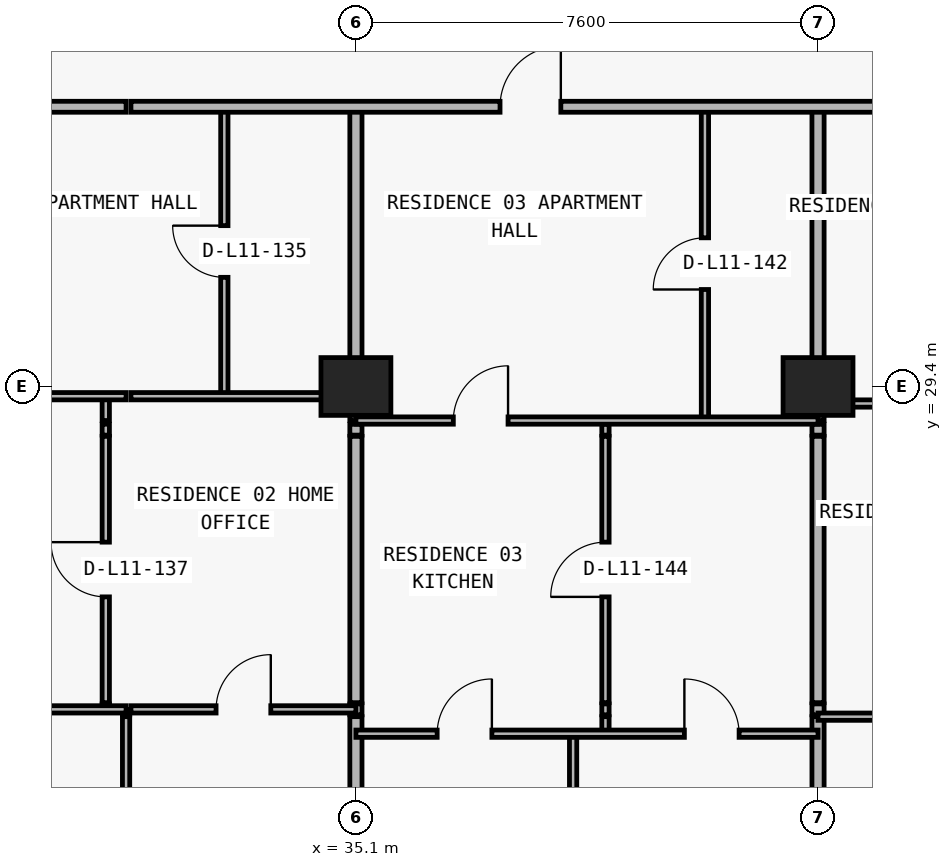
"""IFC4 building model, lengths in metres.
Left out: names, types, materials, properties, quantities, classifications, styles, units other than length and angle.
Written with IfcOpenShell. Run it as: python <this file> out.ifc"""

import sys

from ifc_helpers import new_model, si_unit, direction, frame, frame_2d, origin, origin_2d, place, context, subcontext, project, spatial, rectangle, extrude, element, fill, save


model = new_model("IFC4")
c1 = context("Model", 3, precision=1e-05, world=origin(), true_north=direction((0.0, 1.0)))
c2 = subcontext(c1, "Body", "Model", "MODEL_VIEW")
j1 = project(units=[si_unit("LENGTHUNIT", "METRE"), si_unit("PLANEANGLEUNIT", "RADIAN")], contexts=[c1])
p1 = place(None, origin())
s1 = spatial("IfcSite", under=j1, at=p1, CompositionType="ELEMENT")
p2 = place(p1, origin())
s2 = spatial("IfcBuilding", under=s1, at=p2, CompositionType="ELEMENT")
p3 = place(p2, frame((0.0, 0.0, 46.5)))
s3 = spatial("IfcBuildingStorey", under=s2, at=p3, CompositionType="ELEMENT", Elevation=46.5)
for number, where, z_axis, x_axis in (
    (1, (35.1, 29.4, 0.0), (0.0, 0.0, 1.0), (1.0, 0.0, 0.0)),
    (2, (42.7, 29.4, 0.0), (0.0, 0.0, 1.0), (1.0, 0.0, 0.0)),
):
    element("IfcColumn", number, at=place(p3, frame(where, z_axis=z_axis, x_axis=x_axis)), inside=s3, PredefinedType="COLUMN", context=c2, shape_type="SweptSolid", body=[
        extrude(rectangle(XDim=1.15, YDim=0.95, at=origin_2d()), origin(), (0.0, 0.0, 1.0), 3.05),
    ])
p4 = place(p3, frame((30.986, 24.09, 0.0), z_axis=(0.0, 0.0, 1.0), x_axis=(0.0, 1.0, 0.0)))
e3 = element("IfcWall", 3, at=p4, inside=s3, PredefinedType="PARTITIONING", context=c2, shape_type="SweptSolid", body=[
    extrude(rectangle(XDim=0.09, YDim=0.12, at=frame_2d((0.045, 0.0))), origin(), (0.0, 0.0, 1.0), 3.05),
])
p5 = place(p3, frame((30.986, 24.2, 0.0), z_axis=(0.0, 0.0, 1.0), x_axis=(0.0, 1.0, 0.0)))
e4 = element("IfcWall", 4, at=p5, inside=s3, PredefinedType="PARTITIONING", context=c2, shape_type="SweptSolid", body=[
    extrude(rectangle(XDim=4.38, YDim=0.12, at=frame_2d((2.19, 0.0))), origin(), (0.0, 0.0, 1.0), 3.05),
])
p6 = place(p5, frame((1.74, 0.0, 0.0)))
e5 = element("IfcOpeningElement", 5, at=p6, cuts=e4, PredefinedType="OPENING", context=c2, shape_type="SweptSolid", body=[
    extrude(rectangle(XDim=0.9, YDim=2.15, at=frame_2d((0.45, 1.075))), frame((0.0, 0.07, 0.0), z_axis=(0.0, -1.0, 0.0), x_axis=(1.0, 0.0, 0.0)), (0.0, 0.0, 1.0), 0.14),
])
p7 = place(p3, frame((30.986, 28.6, 0.0), z_axis=(0.0, 0.0, 1.0), x_axis=(0.0, 1.0, 0.0)))
e6 = element("IfcWall", 6, at=p7, inside=s3, PredefinedType="PARTITIONING", context=c2, shape_type="SweptSolid", body=[
    extrude(rectangle(XDim=0.18, YDim=0.12, at=frame_2d((0.09, 0.0))), origin(), (0.0, 0.0, 1.0), 3.05),
])
p8 = place(p3, frame((30.986, 28.84, 0.0), z_axis=(0.0, 0.0, 1.0), x_axis=(0.0, 1.0, 0.0)))
e7 = element("IfcWall", 7, at=p8, inside=s3, PredefinedType="PARTITIONING", context=c2, shape_type="SweptSolid", body=[
    extrude(rectangle(XDim=0.4, YDim=0.12, at=frame_2d((0.2, 0.0))), origin(), (0.0, 0.0, 1.0), 3.05),
])
p9 = place(p3, frame((31.32, 6.24, 0.0), z_axis=(0.0, 0.0, 1.0), x_axis=(0.0, 1.0, 0.0)))
e8 = element("IfcWall", 8, at=p9, inside=s3, PredefinedType="PARTITIONING", context=c2, shape_type="SweptSolid", body=[
    extrude(rectangle(XDim=17.73, YDim=0.12, at=frame_2d((8.865, 0.0))), origin(), (0.0, 0.0, 1.0), 3.05),
])
p10 = place(p3, frame((31.32, 24.0, 0.0), z_axis=(0.0, 0.0, 1.0), x_axis=(0.0, 1.0, 0.0)))
e9 = element("IfcWall", 9, at=p10, inside=s3, PredefinedType="PARTITIONING", context=c2, shape_type="SweptSolid", body=[
    extrude(rectangle(XDim=0.09, YDim=0.12, at=frame_2d((0.045, 0.0))), origin(), (0.0, 0.0, 1.0), 3.05),
])
p11 = place(p3, frame((32.936, 29.24, 0.0), z_axis=(0.0, 0.0, 1.0), x_axis=(0.0, 1.0, 0.0)))
e10 = element("IfcWall", 10, at=p11, inside=s3, PredefinedType="PARTITIONING", context=c2, shape_type="SweptSolid", body=[
    extrude(rectangle(XDim=4.76, YDim=0.12, at=frame_2d((2.38, 0.0))), origin(), (0.0, 0.0, 1.0), 3.05),
])
p12 = place(p11, frame((1.955, 0.0, 0.0)))
e11 = element("IfcOpeningElement", 11, at=p12, cuts=e10, PredefinedType="OPENING", context=c2, shape_type="SweptSolid", body=[
    extrude(rectangle(XDim=0.85, YDim=2.1, at=frame_2d((0.425, 1.05))), frame((0.0, 0.07, 0.0), z_axis=(0.0, -1.0, 0.0), x_axis=(1.0, 0.0, 0.0)), (0.0, 0.0, 1.0), 0.14),
])
p13 = place(p3, frame((35.1, 6.24, 0.0), z_axis=(0.0, 0.0, 1.0), x_axis=(0.0, 1.0, 0.0)))
e12 = element("IfcWall", 12, at=p13, inside=s3, PredefinedType="PARTITIONING", context=c2, shape_type="SweptSolid", body=[
    extrude(rectangle(XDim=17.73, YDim=0.2, at=frame_2d((8.865, 0.0))), origin(), (0.0, 0.0, 1.0), 2.11),
])
p14 = place(p3, frame((35.1, 24.0, 0.0), z_axis=(0.0, 0.0, 1.0), x_axis=(0.0, 1.0, 0.0)))
e13 = element("IfcWall", 13, at=p14, inside=s3, PredefinedType="PARTITIONING", context=c2, shape_type="SweptSolid", body=[
    extrude(rectangle(XDim=0.18, YDim=0.2, at=frame_2d((0.09, 0.0))), origin(), (0.0, 0.0, 1.0), 2.11),
])
p15 = place(p3, frame((35.1, 24.2, 0.0), z_axis=(0.0, 0.0, 1.0), x_axis=(0.0, 1.0, 0.0)))
e14 = element("IfcWall", 14, at=p15, inside=s3, PredefinedType="PARTITIONING", context=c2, shape_type="SweptSolid", body=[
    extrude(rectangle(XDim=4.38, YDim=0.2, at=frame_2d((2.19, 0.0))), origin(), (0.0, 0.0, 1.0), 2.11),
])
p16 = place(p3, frame((35.1, 28.6, 0.0), z_axis=(0.0, 0.0, 1.0), x_axis=(0.0, 1.0, 0.0)))
e15 = element("IfcWall", 15, at=p16, inside=s3, PredefinedType="PARTITIONING", context=c2, shape_type="SweptSolid", body=[
    extrude(rectangle(XDim=0.18, YDim=0.2, at=frame_2d((0.09, 0.0))), origin(), (0.0, 0.0, 1.0), 2.11),
])
p17 = place(p3, frame((35.1, 28.84, 0.0), z_axis=(0.0, 0.0, 1.0), x_axis=(0.0, 1.0, 0.0)))
e16 = element("IfcWall", 16, at=p17, inside=s3, PredefinedType="PARTITIONING", context=c2, shape_type="SweptSolid", body=[
    extrude(rectangle(XDim=5.16, YDim=0.2, at=frame_2d((2.58, 0.0))), origin(), (0.0, 0.0, 1.0), 2.11),
])
p18 = place(p3, frame((38.672, 6.24, 0.0), z_axis=(0.0, 0.0, 1.0), x_axis=(0.0, 1.0, 0.0)))
e17 = element("IfcWall", 17, at=p18, inside=s3, PredefinedType="PARTITIONING", context=c2, shape_type="SweptSolid", body=[
    extrude(rectangle(XDim=17.45, YDim=0.12, at=frame_2d((8.725, 0.0))), origin(), (0.0, 0.0, 1.0), 3.05),
])
p19 = place(p3, frame((39.204, 23.69, 0.0), z_axis=(0.0, 0.0, 1.0), x_axis=(0.0, 1.0, 0.0)))
e18 = element("IfcWall", 18, at=p19, inside=s3, PredefinedType="PARTITIONING", context=c2, shape_type="SweptSolid", body=[
    extrude(rectangle(XDim=0.28, YDim=0.12, at=frame_2d((0.14, 0.0))), origin(), (0.0, 0.0, 1.0), 3.05),
])
p20 = place(p3, frame((39.204, 24.0, 0.0), z_axis=(0.0, 0.0, 1.0), x_axis=(0.0, 1.0, 0.0)))
e19 = element("IfcWall", 19, at=p20, inside=s3, PredefinedType="PARTITIONING", context=c2, shape_type="SweptSolid", body=[
    extrude(rectangle(XDim=0.18, YDim=0.12, at=frame_2d((0.09, 0.0))), origin(), (0.0, 0.0, 1.0), 3.05),
])
p21 = place(p3, frame((39.204, 24.2, 0.0), z_axis=(0.0, 0.0, 1.0), x_axis=(0.0, 1.0, 0.0)))
e20 = element("IfcWall", 20, at=p21, inside=s3, PredefinedType="PARTITIONING", context=c2, shape_type="SweptSolid", body=[
    extrude(rectangle(XDim=4.38, YDim=0.12, at=frame_2d((2.19, 0.0))), origin(), (0.0, 0.0, 1.0), 3.05),
])
p22 = place(p21, frame((1.74, 0.0, 0.0)))
e21 = element("IfcOpeningElement", 21, at=p22, cuts=e20, PredefinedType="OPENING", context=c2, shape_type="SweptSolid", body=[
    extrude(rectangle(XDim=0.9, YDim=2.15, at=frame_2d((0.45, 1.075))), frame((0.0, 0.07, 0.0), z_axis=(0.0, -1.0, 0.0), x_axis=(1.0, 0.0, 0.0)), (0.0, 0.0, 1.0), 0.14),
])
p23 = place(p3, frame((39.204, 28.6, 0.0), z_axis=(0.0, 0.0, 1.0), x_axis=(0.0, 1.0, 0.0)))
e22 = element("IfcWall", 22, at=p23, inside=s3, PredefinedType="PARTITIONING", context=c2, shape_type="SweptSolid", body=[
    extrude(rectangle(XDim=0.18, YDim=0.12, at=frame_2d((0.09, 0.0))), origin(), (0.0, 0.0, 1.0), 3.05),
])
p24 = place(p3, frame((40.84, 28.84, 0.0), z_axis=(0.0, 0.0, 1.0), x_axis=(0.0, 1.0, 0.0)))
e23 = element("IfcWall", 23, at=p24, inside=s3, PredefinedType="PARTITIONING", context=c2, shape_type="SweptSolid", body=[
    extrude(rectangle(XDim=5.16, YDim=0.12, at=frame_2d((2.58, 0.0))), origin(), (0.0, 0.0, 1.0), 3.05),
])
p25 = place(p24, frame((2.155, 0.0, 0.0)))
e24 = element("IfcOpeningElement", 24, at=p25, cuts=e23, PredefinedType="OPENING", context=c2, shape_type="SweptSolid", body=[
    extrude(rectangle(XDim=0.85, YDim=2.1, at=frame_2d((0.425, 1.05))), frame((0.0, 0.07, 0.0), z_axis=(0.0, -1.0, 0.0), x_axis=(1.0, 0.0, 0.0)), (0.0, 0.0, 1.0), 0.14),
])
p26 = place(p3, frame((42.7, 6.24, 0.0), z_axis=(0.0, 0.0, 1.0), x_axis=(0.0, 1.0, 0.0)))
e25 = element("IfcWall", 25, at=p26, inside=s3, PredefinedType="PARTITIONING", context=c2, shape_type="SweptSolid", body=[
    extrude(rectangle(XDim=17.73, YDim=0.2, at=frame_2d((8.865, 0.0))), origin(), (0.0, 0.0, 1.0), 2.11),
])
p27 = place(p3, frame((42.7, 24.0, 0.0), z_axis=(0.0, 0.0, 1.0), x_axis=(0.0, 1.0, 0.0)))
e26 = element("IfcWall", 26, at=p27, inside=s3, PredefinedType="PARTITIONING", context=c2, shape_type="SweptSolid", body=[
    extrude(rectangle(XDim=0.18, YDim=0.2, at=frame_2d((0.09, 0.0))), origin(), (0.0, 0.0, 1.0), 2.11),
])
p28 = place(p3, frame((42.7, 24.2, 0.0), z_axis=(0.0, 0.0, 1.0), x_axis=(0.0, 1.0, 0.0)))
e27 = element("IfcWall", 27, at=p28, inside=s3, PredefinedType="PARTITIONING", context=c2, shape_type="SweptSolid", body=[
    extrude(rectangle(XDim=4.38, YDim=0.2, at=frame_2d((2.19, 0.0))), origin(), (0.0, 0.0, 1.0), 2.11),
])
p29 = place(p3, frame((42.7, 28.6, 0.0), z_axis=(0.0, 0.0, 1.0), x_axis=(0.0, 1.0, 0.0)))
e28 = element("IfcWall", 28, at=p29, inside=s3, PredefinedType="PARTITIONING", context=c2, shape_type="SweptSolid", body=[
    extrude(rectangle(XDim=0.18, YDim=0.2, at=frame_2d((0.09, 0.0))), origin(), (0.0, 0.0, 1.0), 2.11),
])
p30 = place(p3, frame((42.7, 28.84, 0.0), z_axis=(0.0, 0.0, 1.0), x_axis=(0.0, 1.0, 0.0)))
e29 = element("IfcWall", 29, at=p30, inside=s3, PredefinedType="PARTITIONING", context=c2, shape_type="SweptSolid", body=[
    extrude(rectangle(XDim=5.16, YDim=0.2, at=frame_2d((2.58, 0.0))), origin(), (0.0, 0.0, 1.0), 2.11),
])
p31 = place(p3, frame((35.1, 23.69, 0.0), z_axis=(0.0, 0.0, 1.0), x_axis=(1.0, 0.0, 0.0)))
e30 = element("IfcWall", 30, at=p31, inside=s3, PredefinedType="PARTITIONING", context=c2, shape_type="SweptSolid", body=[
    extrude(rectangle(XDim=7.6, YDim=0.12, at=frame_2d((3.8, 0.0))), origin(), (0.0, 0.0, 1.0), 3.05),
])
p32 = place(p31, frame((1.336, 0.0, 0.0)))
e31 = element("IfcOpeningElement", 31, at=p32, cuts=e30, PredefinedType="OPENING", context=c2, shape_type="SweptSolid", body=[
    extrude(rectangle(XDim=0.9, YDim=2.15, at=frame_2d((0.45, 1.075))), frame((0.0, 0.07, 0.0), z_axis=(0.0, -1.0, 0.0), x_axis=(1.0, 0.0, 0.0)), (0.0, 0.0, 1.0), 0.14),
])
p33 = place(p31, frame((5.402, 0.0, 0.0)))
e32 = element("IfcOpeningElement", 32, at=p33, cuts=e30, PredefinedType="OPENING", context=c2, shape_type="SweptSolid", body=[
    extrude(rectangle(XDim=0.9, YDim=2.15, at=frame_2d((0.45, 1.075))), frame((0.0, 0.07, 0.0), z_axis=(0.0, -1.0, 0.0), x_axis=(1.0, 0.0, 0.0)), (0.0, 0.0, 1.0), 0.14),
])
p34 = place(p3, frame((42.7, 23.97, 0.0), z_axis=(0.0, 0.0, 1.0), x_axis=(1.0, 0.0, 0.0)))
e33 = element("IfcWall", 33, at=p34, inside=s3, PredefinedType="PARTITIONING", context=c2, shape_type="SweptSolid", body=[
    extrude(rectangle(XDim=8.13, YDim=0.12, at=frame_2d((4.065, 0.0))), origin(), (0.0, 0.0, 1.0), 3.05),
])
p35 = place(p34, frame((1.86, 0.0, 0.0)))
e34 = element("IfcOpeningElement", 34, at=p35, cuts=e33, PredefinedType="OPENING", context=c2, shape_type="SweptSolid", body=[
    extrude(rectangle(XDim=0.9, YDim=2.15, at=frame_2d((0.45, 1.075))), frame((0.0, 0.07, 0.0), z_axis=(0.0, -1.0, 0.0), x_axis=(1.0, 0.0, 0.0)), (0.0, 0.0, 1.0), 0.14),
])
p36 = place(p34, frame((6.008, 0.0, 0.0)))
e35 = element("IfcOpeningElement", 35, at=p36, cuts=e33, PredefinedType="OPENING", context=c2, shape_type="SweptSolid", body=[
    extrude(rectangle(XDim=0.9, YDim=2.15, at=frame_2d((0.45, 1.075))), frame((0.0, 0.07, 0.0), z_axis=(0.0, -1.0, 0.0), x_axis=(1.0, 0.0, 0.0)), (0.0, 0.0, 1.0), 0.14),
])
p37 = place(p3, frame((26.97, 24.09, 0.0), z_axis=(0.0, 0.0, 1.0), x_axis=(1.0, 0.0, 0.0)))
e36 = element("IfcWall", 36, at=p37, inside=s3, PredefinedType="PARTITIONING", context=c2, shape_type="SweptSolid", body=[
    extrude(rectangle(XDim=4.35, YDim=0.12, at=frame_2d((2.175, 0.0))), origin(), (0.0, 0.0, 1.0), 3.05),
])
p38 = place(p37, frame((1.558, 0.0, 0.0)))
e37 = element("IfcOpeningElement", 37, at=p38, cuts=e36, PredefinedType="OPENING", context=c2, shape_type="SweptSolid", body=[
    extrude(rectangle(XDim=0.9, YDim=2.15, at=frame_2d((0.45, 1.075))), frame((0.0, 0.07, 0.0), z_axis=(0.0, -1.0, 0.0), x_axis=(1.0, 0.0, 0.0)), (0.0, 0.0, 1.0), 0.14),
])
p39 = place(p3, frame((31.4, 24.09, 0.0), z_axis=(0.0, 0.0, 1.0), x_axis=(1.0, 0.0, 0.0)))
e38 = element("IfcWall", 38, at=p39, inside=s3, PredefinedType="PARTITIONING", context=c2, shape_type="SweptSolid", body=[
    extrude(rectangle(XDim=3.7, YDim=0.12, at=frame_2d((1.85, 0.0))), origin(), (0.0, 0.0, 1.0), 3.05),
])
p40 = place(p39, frame((1.4, 0.0, 0.0)))
e39 = element("IfcOpeningElement", 39, at=p40, cuts=e38, PredefinedType="OPENING", context=c2, shape_type="SweptSolid", body=[
    extrude(rectangle(XDim=0.9, YDim=2.15, at=frame_2d((0.45, 1.075))), frame((0.0, 0.07, 0.0), z_axis=(0.0, -1.0, 0.0), x_axis=(1.0, 0.0, 0.0)), (0.0, 0.0, 1.0), 0.14),
])
p41 = place(p3, frame((35.1, 28.84, 0.0), z_axis=(0.0, 0.0, 1.0), x_axis=(1.0, 0.0, 0.0)))
e40 = element("IfcWall", 40, at=p41, inside=s3, PredefinedType="PARTITIONING", context=c2, shape_type="SweptSolid", body=[
    extrude(rectangle(XDim=7.6, YDim=0.12, at=frame_2d((3.8, 0.0))), origin(), (0.0, 0.0, 1.0), 3.05),
])
p42 = place(p41, frame((1.602, 0.0, 0.0)))
e41 = element("IfcOpeningElement", 41, at=p42, cuts=e40, PredefinedType="OPENING", context=c2, shape_type="SweptSolid", body=[
    extrude(rectangle(XDim=0.9, YDim=2.15, at=frame_2d((0.45, 1.075))), frame((0.0, 0.07, 0.0), z_axis=(0.0, -1.0, 0.0), x_axis=(1.0, 0.0, 0.0)), (0.0, 0.0, 1.0), 0.14),
])
p43 = place(p3, frame((42.7, 29.12, 0.0), z_axis=(0.0, 0.0, 1.0), x_axis=(1.0, 0.0, 0.0)))
e42 = element("IfcWall", 42, at=p43, inside=s3, PredefinedType="PARTITIONING", context=c2, shape_type="SweptSolid", body=[
    extrude(rectangle(XDim=8.13, YDim=0.12, at=frame_2d((4.065, 0.0))), origin(), (0.0, 0.0, 1.0), 2.11),
])
p44 = place(p43, frame((1.943, 0.0, 0.0)))
e43 = element("IfcOpeningElement", 43, at=p44, cuts=e42, PredefinedType="OPENING", context=c2, shape_type="SweptSolid", body=[
    extrude(rectangle(XDim=0.9, YDim=2.06, at=frame_2d((0.45, 1.03))), frame((0.0, 0.07, 0.0), z_axis=(0.0, -1.0, 0.0), x_axis=(1.0, 0.0, 0.0)), (0.0, 0.0, 1.0), 0.14),
])
p45 = place(p3, frame((26.97, 29.24, 0.0), z_axis=(0.0, 0.0, 1.0), x_axis=(1.0, 0.0, 0.0)))
e44 = element("IfcWall", 44, at=p45, inside=s3, PredefinedType="PARTITIONING", context=c2, shape_type="SweptSolid", body=[
    extrude(rectangle(XDim=4.35, YDim=0.12, at=frame_2d((2.175, 0.0))), origin(), (0.0, 0.0, 1.0), 2.11),
])
p46 = place(p45, frame((1.558, 0.0, 0.0)))
e45 = element("IfcOpeningElement", 45, at=p46, cuts=e44, PredefinedType="OPENING", context=c2, shape_type="SweptSolid", body=[
    extrude(rectangle(XDim=0.9, YDim=2.06, at=frame_2d((0.45, 1.03))), frame((0.0, 0.07, 0.0), z_axis=(0.0, -1.0, 0.0), x_axis=(1.0, 0.0, 0.0)), (0.0, 0.0, 1.0), 0.14),
])
p47 = place(p3, frame((31.4, 29.24, 0.0), z_axis=(0.0, 0.0, 1.0), x_axis=(1.0, 0.0, 0.0)))
e46 = element("IfcWall", 46, at=p47, inside=s3, PredefinedType="PARTITIONING", context=c2, shape_type="SweptSolid", body=[
    extrude(rectangle(XDim=3.7, YDim=0.12, at=frame_2d((1.85, 0.0))), origin(), (0.0, 0.0, 1.0), 2.11),
])
p48 = place(p3, frame((26.7, 34.0, 0.0), z_axis=(0.0, 0.0, 1.0), x_axis=(1.0, 0.0, 0.0)))
e47 = element("IfcWall", 47, at=p48, inside=s3, PredefinedType="PARTITIONING", context=c2, shape_type="SweptSolid", body=[
    extrude(rectangle(XDim=4.62, YDim=0.18, at=frame_2d((2.31, 0.0))), origin(), (0.0, 0.0, 1.0), 3.05),
])
p49 = place(p48, frame((1.81, 0.0, 0.0)))
e48 = element("IfcOpeningElement", 48, at=p49, cuts=e47, PredefinedType="OPENING", context=c2, shape_type="SweptSolid", body=[
    extrude(rectangle(XDim=1.0, YDim=2.2, at=frame_2d((0.5, 1.1))), frame((0.0, 0.1, 0.0), z_axis=(0.0, -1.0, 0.0), x_axis=(1.0, 0.0, 0.0)), (0.0, 0.0, 1.0), 0.2),
])
p50 = place(p3, frame((31.4, 34.0, 0.0), z_axis=(0.0, 0.0, 1.0), x_axis=(1.0, 0.0, 0.0)))
e49 = element("IfcWall", 49, at=p50, inside=s3, PredefinedType="PARTITIONING", context=c2, shape_type="SweptSolid", body=[
    extrude(rectangle(XDim=41.3, YDim=0.18, at=frame_2d((20.65, 0.0))), origin(), (0.0, 0.0, 1.0), 3.05),
])
p51 = place(p50, frame((6.07, 0.0, 0.0)))
e50 = element("IfcOpeningElement", 50, at=p51, cuts=e49, PredefinedType="OPENING", context=c2, shape_type="SweptSolid", body=[
    extrude(rectangle(XDim=1.0, YDim=2.2, at=frame_2d((0.5, 1.1))), frame((0.0, 0.1, 0.0), z_axis=(0.0, -1.0, 0.0), x_axis=(1.0, 0.0, 0.0)), (0.0, 0.0, 1.0), 0.2),
])
p52 = place(p50, frame((13.945, 0.0, 0.0)))
e51 = element("IfcOpeningElement", 51, at=p52, cuts=e49, PredefinedType="OPENING", context=c2, shape_type="SweptSolid", body=[
    extrude(rectangle(XDim=1.0, YDim=2.2, at=frame_2d((0.5, 1.1))), frame((0.0, 0.1, 0.0), z_axis=(0.0, -1.0, 0.0), x_axis=(1.0, 0.0, 0.0)), (0.0, 0.0, 1.0), 0.2),
])
p53 = place(p50, frame((22.414, 0.0, 0.0)))
e52 = element("IfcOpeningElement", 52, at=p53, cuts=e49, PredefinedType="OPENING", context=c2, shape_type="SweptSolid", body=[
    extrude(rectangle(XDim=1.0, YDim=2.2, at=frame_2d((0.5, 1.1))), frame((0.0, 0.1, 0.0), z_axis=(0.0, -1.0, 0.0), x_axis=(1.0, 0.0, 0.0)), (0.0, 0.0, 1.0), 0.2),
])
p54 = place(p12, origin())
e53 = element("IfcDoor", 53, at=p54, inside=s3, OperationType="SINGLE_SWING_RIGHT", PredefinedType="DOOR", context=c2, shape_type="SweptSolid", body=[
    extrude(rectangle(XDim=0.85, YDim=2.1, at=frame_2d((0.425, 1.05))), frame((0.0, 0.025, 0.0), z_axis=(0.0, -1.0, 0.0), x_axis=(1.0, 0.0, 0.0)), (0.0, 0.0, 1.0), 0.05),
])
fill(e11, e53)
p55 = place(p6, origin())
e54 = element("IfcDoor", 54, at=p55, inside=s3, OperationType="SINGLE_SWING_RIGHT", PredefinedType="DOOR", context=c2, shape_type="SweptSolid", body=[
    extrude(rectangle(XDim=0.9, YDim=2.15, at=frame_2d((0.45, 1.075))), frame((0.0, 0.025, 0.0), z_axis=(0.0, -1.0, 0.0), x_axis=(1.0, 0.0, 0.0)), (0.0, 0.0, 1.0), 0.05),
])
fill(e5, e54)
p56 = place(p40, origin())
e55 = element("IfcDoor", 55, at=p56, inside=s3, OperationType="SINGLE_SWING_RIGHT", PredefinedType="DOOR", context=c2, shape_type="SweptSolid", body=[
    extrude(rectangle(XDim=0.9, YDim=2.15, at=frame_2d((0.45, 1.075))), frame((0.0, 0.025, 0.0), z_axis=(0.0, -1.0, 0.0), x_axis=(1.0, 0.0, 0.0)), (0.0, 0.0, 1.0), 0.05),
])
fill(e39, e55)
p57 = place(p51, origin())
e56 = element("IfcDoor", 56, at=p57, inside=s3, OperationType="SINGLE_SWING_RIGHT", PredefinedType="DOOR", context=c2, shape_type="SweptSolid", body=[
    extrude(rectangle(XDim=1.0, YDim=2.2, at=frame_2d((0.5, 1.1))), frame((0.0, 0.025, 0.0), z_axis=(0.0, -1.0, 0.0), x_axis=(1.0, 0.0, 0.0)), (0.0, 0.0, 1.0), 0.05),
])
fill(e50, e56)
p58 = place(p25, origin())
e57 = element("IfcDoor", 57, at=p58, inside=s3, OperationType="SINGLE_SWING_LEFT", PredefinedType="DOOR", context=c2, shape_type="SweptSolid", body=[
    extrude(rectangle(XDim=0.85, YDim=2.1, at=frame_2d((0.425, 1.05))), frame((0.0, 0.025, 0.0), z_axis=(0.0, -1.0, 0.0), x_axis=(1.0, 0.0, 0.0)), (0.0, 0.0, 1.0), 0.05),
])
fill(e24, e57)
p59 = place(p42, origin())
e58 = element("IfcDoor", 58, at=p59, inside=s3, OperationType="SINGLE_SWING_RIGHT", PredefinedType="DOOR", context=c2, shape_type="SweptSolid", body=[
    extrude(rectangle(XDim=0.9, YDim=2.15, at=frame_2d((0.45, 1.075))), frame((0.0, 0.025, 0.0), z_axis=(0.0, -1.0, 0.0), x_axis=(1.0, 0.0, 0.0)), (0.0, 0.0, 1.0), 0.05),
])
fill(e41, e58)
p60 = place(p22, origin())
e59 = element("IfcDoor", 59, at=p60, inside=s3, OperationType="SINGLE_SWING_LEFT", PredefinedType="DOOR", context=c2, shape_type="SweptSolid", body=[
    extrude(rectangle(XDim=0.9, YDim=2.15, at=frame_2d((0.45, 1.075))), frame((0.0, 0.025, 0.0), z_axis=(0.0, -1.0, 0.0), x_axis=(1.0, 0.0, 0.0)), (0.0, 0.0, 1.0), 0.05),
])
fill(e21, e59)
p61 = place(p32, origin())
e60 = element("IfcDoor", 60, at=p61, inside=s3, OperationType="SINGLE_SWING_RIGHT", PredefinedType="DOOR", context=c2, shape_type="SweptSolid", body=[
    extrude(rectangle(XDim=0.9, YDim=2.15, at=frame_2d((0.45, 1.075))), frame((0.0, 0.025, 0.0), z_axis=(0.0, -1.0, 0.0), x_axis=(1.0, 0.0, 0.0)), (0.0, 0.0, 1.0), 0.05),
])
fill(e31, e60)
p62 = place(p33, origin())
e61 = element("IfcDoor", 61, at=p62, inside=s3, OperationType="SINGLE_SWING_LEFT", PredefinedType="DOOR", context=c2, shape_type="SweptSolid", body=[
    extrude(rectangle(XDim=0.9, YDim=2.15, at=frame_2d((0.45, 1.075))), frame((0.0, 0.025, 0.0), z_axis=(0.0, -1.0, 0.0), x_axis=(1.0, 0.0, 0.0)), (0.0, 0.0, 1.0), 0.05),
])
fill(e32, e61)
save(model, sys.argv[1])
